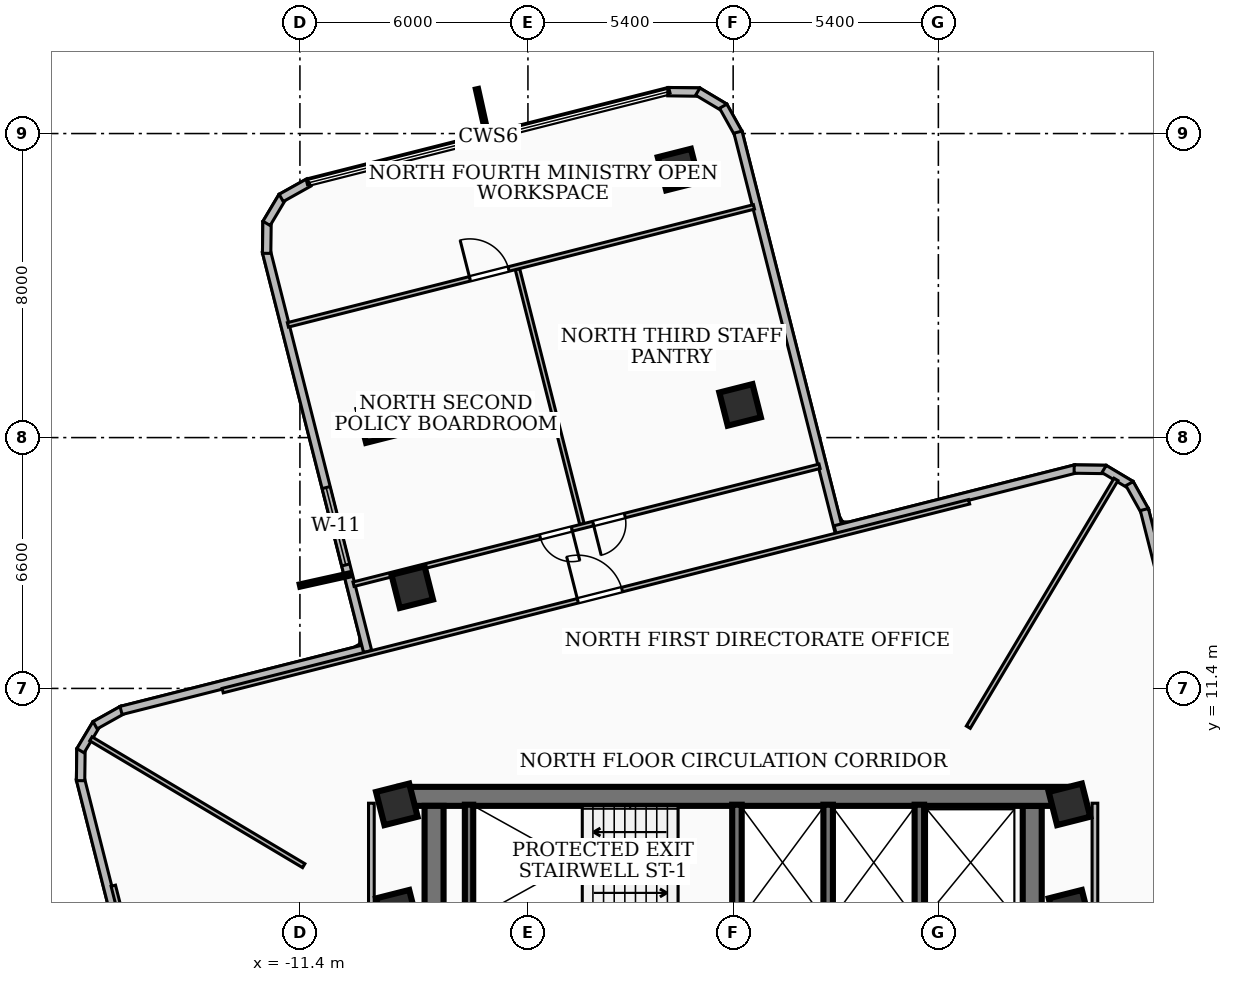
"""IFC4 building model, lengths in metres.
Left out: names, types, materials, properties, quantities, classifications, styles, units other than length and angle.
Written with IfcOpenShell. Run it as: python <this file> out.ifc"""

import sys

from ifc_helpers import new_model, si_unit, direction, frame, frame_2d, origin, origin_2d, place, context, subcontext, project, spatial, rectangle, extrude, element, fill, save


model = new_model("IFC4")
c1 = context("Model", 3, precision=1e-05, world=origin(), true_north=direction((0.0, 1.0)))
c2 = subcontext(c1, "Body", "Model", "MODEL_VIEW")
j1 = project(units=[si_unit("LENGTHUNIT", "METRE"), si_unit("PLANEANGLEUNIT", "RADIAN")], contexts=[c1])
p1 = place(None, origin())
s1 = spatial("IfcSite", under=j1, at=p1, CompositionType="ELEMENT")
p2 = place(p1, origin())
s2 = spatial("IfcBuilding", under=s1, at=p2, CompositionType="ELEMENT")
p3 = place(p2, frame((0.0, 0.0, 127.08)))
s3 = spatial("IfcBuildingStorey", under=s2, at=p3, CompositionType="ELEMENT", Elevation=127.08)
p4 = place(p3, frame((-8.78, 8.56, 0.0), z_axis=(0.0, 0.0, 1.0), x_axis=(1.0, 0.0, 0.0)))
e1 = element("IfcWall", 1, at=p4, inside=s3, PredefinedType="SHEAR", context=c2, shape_type="SweptSolid", body=[
    extrude(rectangle(XDim=17.56, YDim=0.5, at=frame_2d((8.78, 0.0))), origin(), (0.0, 0.0, 1.0), 3.34),
])
for number, where, z_axis, x_axis in (
    (2, (-7.87, 2.0, 0.0), (0.0, 0.0, 1.0), (0.0, 1.0, 0.0)),
    (3, (7.87, 8.31, 0.0), (0.0, 0.0, 1.0), (0.0, -1.0, 0.0)),
):
    element("IfcWall", number, at=place(p3, frame(where, z_axis=z_axis, x_axis=x_axis)), inside=s3, PredefinedType="SHEAR", context=c2, shape_type="SweptSolid", body=[
        extrude(rectangle(XDim=6.31, YDim=0.5, at=frame_2d((3.155, 0.0))), origin(), (0.0, 0.0, 1.0), 3.34),
    ])
p5 = place(p3, frame((-6.95, 5.28, 0.0), z_axis=(0.0, 0.0, 1.0), x_axis=(0.0, 1.0, 0.0)))
e4 = element("IfcWall", 4, at=p5, inside=s3, PredefinedType="SOLIDWALL", context=c2, shape_type="SweptSolid", body=[
    extrude(rectangle(XDim=3.06, YDim=0.22, at=frame_2d((1.53, 0.0))), origin(), (0.0, 0.0, 1.0), 3.34),
])
for number, where, z_axis, x_axis in (
    (5, (0.1, 5.3, 0.0), (0.0, 0.0, 1.0), (0.0, 1.0, 0.0)),
    (6, (2.5, 5.3, 0.0), (0.0, 0.0, 1.0), (0.0, 1.0, 0.0)),
    (7, (4.9, 5.3, 0.0), (0.0, 0.0, 1.0), (0.0, 1.0, 0.0)),
):
    element("IfcWall", number, at=place(p3, frame(where, z_axis=z_axis, x_axis=x_axis)), inside=s3, PredefinedType="SOLIDWALL", context=c2, shape_type="SweptSolid", body=[
        extrude(rectangle(XDim=3.04, YDim=0.25, at=frame_2d((1.52, 0.0))), origin(), (0.0, 0.0, 1.0), 3.34),
    ])
for number, where, z_axis, x_axis in (
    (8, (-8.85, 5.55, 0.0), (0.0, 0.0, 1.0), (0.969, 0.245, 0.0)),
    (9, (8.85, 5.55, 0.0), (0.0, 0.0, 1.0), (0.969, 0.245, 0.0)),
    (10, (-8.85, 8.35, 0.0), (0.0, 0.0, 1.0), (0.969, 0.245, 0.0)),
    (11, (8.85, 8.35, 0.0), (0.0, 0.0, 1.0), (0.969, 0.245, 0.0)),
    (12, (0.183, 18.86, 0.0), (0.0, 0.0, 1.0), (0.969, 0.245, 0.0)),
    (13, (-8.445, 14.064, 0.0), (0.0, 0.0, 1.0), (0.969, 0.245, 0.0)),
    (14, (-1.437, 25.052, 0.0), (0.0, 0.0, 1.0), (0.969, 0.245, 0.0)),
    (15, (-9.333, 18.409, 0.0), (0.0, 0.0, 1.0), (0.969, 0.245, 0.0)),
):
    element("IfcColumn", number, at=place(p3, frame(where, z_axis=z_axis, x_axis=x_axis)), inside=s3, PredefinedType="COLUMN", context=c2, shape_type="SweptSolid", body=[
        extrude(rectangle(XDim=0.9, YDim=0.9, at=origin_2d()), origin(), (0.0, 0.0, 1.0), 3.6),
    ])
p6 = place(p3, frame((-15.574, 2.684, 0.0), z_axis=(0.0, 0.0, 1.0), x_axis=(-0.245346347134, 0.969435490349, 0.0)))
e16 = element("IfcWall", 16, at=p6, inside=s3, PredefinedType="SOLIDWALL", context=c2, shape_type="SweptSolid", body=[
    extrude(rectangle(XDim=6.538, YDim=0.22, at=frame_2d((3.269, 0.0))), origin(), (0.0, 0.0, 1.0), 3.34),
])
p7 = place(p3, frame((-17.172, 8.973, 0.0), z_axis=(0.0, 0.0, 1.0), x_axis=(0.013464821393, 0.999909345183, 0.0)))
e17 = element("IfcWall", 17, at=p7, inside=s3, PredefinedType="SOLIDWALL", context=c2, shape_type="SweptSolid", body=[
    extrude(rectangle(XDim=0.834, YDim=0.22, at=frame_2d((0.417, 0.0))), origin(), (0.0, 0.0, 1.0), 3.34),
])
p8 = place(p3, frame((-17.174, 9.761, 0.0), z_axis=(0.0, 0.0, 1.0), x_axis=(0.512960801038, 0.858412031951, 0.0)))
e18 = element("IfcWall", 18, at=p8, inside=s3, PredefinedType="SOLIDWALL", context=c2, shape_type="SweptSolid", body=[
    extrude(rectangle(XDim=0.819, YDim=0.22, at=frame_2d((0.41, 0.0))), origin(), (0.0, 0.0, 1.0), 3.34),
])
p9 = place(p3, frame((-16.789, 10.431, 0.0), z_axis=(0.0, 0.0, 1.0), x_axis=(0.872870149311, 0.487952561671, 0.0)))
e19 = element("IfcWall", 19, at=p9, inside=s3, PredefinedType="SOLIDWALL", context=c2, shape_type="SweptSolid", body=[
    extrude(rectangle(XDim=0.834, YDim=0.22, at=frame_2d((0.417, 0.0))), origin(), (0.0, 0.0, 1.0), 3.34),
])
p10 = place(p3, frame((-16.107, 10.82, 0.0), z_axis=(0.0, 0.0, 1.0), x_axis=(0.969443674581, 0.245314006561, 0.0)))
e20 = element("IfcWall", 20, at=p10, inside=s3, PredefinedType="SOLIDWALL", context=c2, shape_type="SweptSolid", body=[
    extrude(rectangle(XDim=6.759, YDim=0.22, at=frame_2d((3.379, 0.0))), origin(), (0.0, 0.0, 1.0), 3.34),
])
p11 = place(p3, frame((-9.618, 12.371, 0.0), z_axis=(0.0, 0.0, 1.0), x_axis=(-0.245359810912, 0.969432082814, 0.0)))
e21 = element("IfcWall", 21, at=p11, inside=s3, PredefinedType="SOLIDWALL", context=c2, shape_type="SweptSolid", body=[
    extrude(rectangle(XDim=10.858, YDim=0.22, at=frame_2d((5.429, 0.0))), origin(), (0.0, 0.0, 1.0), 3.34),
])
p12 = place(p11, frame((2.35, 0.0, 0.85)))
e22 = element("IfcOpeningElement", 22, at=p12, cuts=e21, PredefinedType="OPENING", context=c2, shape_type="SweptSolid", body=[
    extrude(rectangle(XDim=2.1, YDim=1.6, at=frame_2d((1.05, 0.8))), frame((0.0, 0.12, 0.0), z_axis=(0.0, -1.0, 0.0), x_axis=(1.0, 0.0, 0.0)), (0.0, 0.0, 1.0), 0.24),
])
p13 = place(p3, frame((-12.276, 22.848, 0.0), z_axis=(0.0, 0.0, 1.0), x_axis=(0.013172159236, 0.999913243347, 0.0)))
e23 = element("IfcWall", 23, at=p13, inside=s3, PredefinedType="SOLIDWALL", context=c2, shape_type="SweptSolid", body=[
    extrude(rectangle(XDim=0.834, YDim=0.22, at=frame_2d((0.417, 0.0))), origin(), (0.0, 0.0, 1.0), 3.34),
])
p14 = place(p3, frame((-12.278, 23.636, 0.0), z_axis=(0.0, 0.0, 1.0), x_axis=(0.512960801038, 0.858412031951, 0.0)))
e24 = element("IfcWall", 24, at=p14, inside=s3, PredefinedType="SOLIDWALL", context=c2, shape_type="SweptSolid", body=[
    extrude(rectangle(XDim=0.819, YDim=0.22, at=frame_2d((0.41, 0.0))), origin(), (0.0, 0.0, 1.0), 3.34),
])
p15 = place(p3, frame((-11.893, 24.306, 0.0), z_axis=(0.0, 0.0, 1.0), x_axis=(0.872870149311, 0.487952561671, 0.0)))
e25 = element("IfcWall", 25, at=p15, inside=s3, PredefinedType="SOLIDWALL", context=c2, shape_type="SweptSolid", body=[
    extrude(rectangle(XDim=0.834, YDim=0.22, at=frame_2d((0.417, 0.0))), origin(), (0.0, 0.0, 1.0), 3.34),
])
p16 = place(p3, frame((-1.72, 27.102, 0.0), z_axis=(0.0, 0.0, 1.0), x_axis=(0.999913446142, -0.01315675587, 0.0)))
e26 = element("IfcWall", 26, at=p16, inside=s3, PredefinedType="SOLIDWALL", context=c2, shape_type="SweptSolid", body=[
    extrude(rectangle(XDim=0.835, YDim=0.22, at=frame_2d((0.417, 0.0))), origin(), (0.0, 0.0, 1.0), 3.34),
])
p17 = place(p3, frame((-0.931, 27.104, 0.0), z_axis=(0.0, 0.0, 1.0), x_axis=(0.858676543827, -0.512517895376, 0.0)))
e27 = element("IfcWall", 27, at=p17, inside=s3, PredefinedType="SOLIDWALL", context=c2, shape_type="SweptSolid", body=[
    extrude(rectangle(XDim=0.817, YDim=0.22, at=frame_2d((0.409, 0.0))), origin(), (0.0, 0.0, 1.0), 3.34),
])
p18 = place(p3, frame((-0.262, 26.72, 0.0), z_axis=(0.0, 0.0, 1.0), x_axis=(0.487454303052, -0.873148499647, 0.0)))
e28 = element("IfcWall", 28, at=p18, inside=s3, PredefinedType="SOLIDWALL", context=c2, shape_type="SweptSolid", body=[
    extrude(rectangle(XDim=0.835, YDim=0.22, at=frame_2d((0.417, 0.0))), origin(), (0.0, 0.0, 1.0), 3.34),
])
p19 = place(p3, frame((0.127, 26.037, 0.0), z_axis=(0.0, 0.0, 1.0), x_axis=(0.245354462674, -0.969433436418, 0.0)))
e29 = element("IfcWall", 29, at=p19, inside=s3, PredefinedType="SOLIDWALL", context=c2, shape_type="SweptSolid", body=[
    extrude(rectangle(XDim=10.858, YDim=0.22, at=frame_2d((5.429, 0.0))), origin(), (0.0, 0.0, 1.0), 2.57),
])
p20 = place(p3, frame((2.684, 15.574, 0.0), z_axis=(0.0, 0.0, 1.0), x_axis=(0.969435490349, 0.245346347134, 0.0)))
e30 = element("IfcWall", 30, at=p20, inside=s3, PredefinedType="SOLIDWALL", context=c2, shape_type="SweptSolid", body=[
    extrude(rectangle(XDim=6.538, YDim=0.22, at=frame_2d((3.269, 0.0))), origin(), (0.0, 0.0, 1.0), 2.57),
])
p21 = place(p3, frame((8.973, 17.172, 0.0), z_axis=(0.0, 0.0, 1.0), x_axis=(0.999909345183, -0.013464821393, 0.0)))
e31 = element("IfcWall", 31, at=p21, inside=s3, PredefinedType="SOLIDWALL", context=c2, shape_type="SweptSolid", body=[
    extrude(rectangle(XDim=0.834, YDim=0.22, at=frame_2d((0.417, 0.0))), origin(), (0.0, 0.0, 1.0), 3.34),
])
p22 = place(p3, frame((9.761, 17.174, 0.0), z_axis=(0.0, 0.0, 1.0), x_axis=(0.858412031951, -0.512960801038, 0.0)))
e32 = element("IfcWall", 32, at=p22, inside=s3, PredefinedType="SOLIDWALL", context=c2, shape_type="SweptSolid", body=[
    extrude(rectangle(XDim=0.819, YDim=0.22, at=frame_2d((0.41, 0.0))), origin(), (0.0, 0.0, 1.0), 3.34),
])
p23 = place(p3, frame((10.431, 16.789, 0.0), z_axis=(0.0, 0.0, 1.0), x_axis=(0.487952561671, -0.872870149311, 0.0)))
e33 = element("IfcWall", 33, at=p23, inside=s3, PredefinedType="SOLIDWALL", context=c2, shape_type="SweptSolid", body=[
    extrude(rectangle(XDim=0.834, YDim=0.22, at=frame_2d((0.417, 0.0))), origin(), (0.0, 0.0, 1.0), 3.34),
])
p24 = place(p3, frame((10.82, 16.107, 0.0), z_axis=(0.0, 0.0, 1.0), x_axis=(0.245314006561, -0.969443674581, 0.0)))
e34 = element("IfcWall", 34, at=p24, inside=s3, PredefinedType="SOLIDWALL", context=c2, shape_type="SweptSolid", body=[
    extrude(rectangle(XDim=6.759, YDim=0.22, at=frame_2d((3.379, 0.0))), origin(), (0.0, 0.0, 1.0), 2.644),
])
for number, where, z_axis, x_axis in (
    (35, (-9.52, 1.75, 0.0), (0.0, 0.0, 1.0), (0.0, 1.0, 0.0)),
    (36, (9.52, 1.75, 0.0), (0.0, 0.0, 1.0), (0.0, 1.0, 0.0)),
):
    element("IfcWall", number, at=place(p3, frame(where, z_axis=z_axis, x_axis=x_axis)), inside=s3, PredefinedType="PARTITIONING", context=c2, shape_type="SweptSolid", body=[
        extrude(rectangle(XDim=6.63, YDim=0.15, at=frame_2d((3.315, 0.0))), origin(), (0.0, 0.0, 1.0), 2.57),
    ])
p25 = place(p3, frame((6.188, 10.38, 0.0), z_axis=(0.0, 0.0, 1.0), x_axis=(0.511972353143, 0.859001926434, 0.0)))
e37 = element("IfcWall", 37, at=p25, inside=s3, PredefinedType="PARTITIONING", context=c2, shape_type="SweptSolid", body=[
    extrude(rectangle(XDim=7.59, YDim=0.12, at=frame_2d((3.795, 0.0))), origin(), (0.0, 0.0, 1.0), 2.57),
])
p26 = place(p3, frame((-11.3, 6.736, 0.0), z_axis=(0.0, 0.0, 1.0), x_axis=(-0.858979599017, 0.512009812868, 0.0)))
e38 = element("IfcWall", 38, at=p26, inside=s3, PredefinedType="PARTITIONING", context=c2, shape_type="SweptSolid", body=[
    extrude(rectangle(XDim=6.519, YDim=0.12, at=frame_2d((3.26, 0.0))), origin(), (0.0, 0.0, 1.0), 3.34),
])
p27 = place(p3, frame((-13.433, 11.342, 0.0), z_axis=(0.0, 0.0, 1.0), x_axis=(0.969459652587, 0.24525085526, 0.0)))
e39 = element("IfcWall", 39, at=p27, inside=s3, PredefinedType="PARTITIONING", context=c2, shape_type="SweptSolid", body=[
    extrude(rectangle(XDim=20.261, YDim=0.12, at=frame_2d((10.13, 0.0))), origin(), (0.0, 0.0, 1.0), 2.57),
])
p28 = place(p27, frame((9.64, 0.0, 0.0)))
e40 = element("IfcOpeningElement", 40, at=p28, cuts=e39, PredefinedType="OPENING", context=c2, shape_type="SweptSolid", body=[
    extrude(rectangle(XDim=1.2, YDim=2.1, at=frame_2d((0.6, 1.05))), frame((0.0, 0.07, 0.0), z_axis=(0.0, -1.0, 0.0), x_axis=(1.0, 0.0, 0.0)), (0.0, 0.0, 1.0), 0.14),
])
p29 = place(p3, frame((-3.979, 15.724, 0.0), z_axis=(0.0, 0.0, 1.0), x_axis=(-0.245224196517, 0.969466396242, 0.0)))
e41 = element("IfcWall", 41, at=p29, inside=s3, PredefinedType="PARTITIONING", context=c2, shape_type="SweptSolid", body=[
    extrude(rectangle(XDim=6.92, YDim=0.12, at=frame_2d((3.46, 0.0))), origin(), (0.0, 0.0, 1.0), 2.72),
])
p30 = place(p3, frame((2.274, 17.245, 0.0), z_axis=(0.0, 0.0, 1.0), x_axis=(-0.969444849394, -0.24530936383, 0.0)))
e42 = element("IfcWall", 42, at=p30, inside=s3, PredefinedType="PARTITIONING", context=c2, shape_type="SweptSolid", body=[
    extrude(rectangle(XDim=12.649, YDim=0.12, at=frame_2d((6.325, 0.0))), origin(), (0.0, 0.0, 1.0), 2.57),
])
p31 = place(p30, frame((5.285, 0.0, 0.0)))
e43 = element("IfcOpeningElement", 43, at=p31, cuts=e42, PredefinedType="OPENING", context=c2, shape_type="SweptSolid", body=[
    extrude(rectangle(XDim=0.86, YDim=2.04, at=frame_2d((0.43, 1.02))), frame((0.0, 0.07, 0.0), z_axis=(0.0, -1.0, 0.0), x_axis=(1.0, 0.0, 0.0)), (0.0, 0.0, 1.0), 0.14),
])
p32 = place(p30, frame((6.725, 0.0, 0.0)))
e44 = element("IfcOpeningElement", 44, at=p32, cuts=e42, PredefinedType="OPENING", context=c2, shape_type="SweptSolid", body=[
    extrude(rectangle(XDim=0.86, YDim=2.04, at=frame_2d((0.43, 1.02))), frame((0.0, 0.07, 0.0), z_axis=(0.0, -1.0, 0.0), x_axis=(1.0, 0.0, 0.0)), (0.0, 0.0, 1.0), 0.14),
])
p33 = place(p3, frame((-11.716, 20.966, 0.0), z_axis=(0.0, 0.0, 1.0), x_axis=(0.96942764939, 0.245377326983, 0.0)))
e45 = element("IfcWall", 45, at=p33, inside=s3, PredefinedType="PARTITIONING", context=c2, shape_type="SweptSolid", body=[
    extrude(rectangle(XDim=12.65, YDim=0.12, at=frame_2d((6.325, 0.0))), origin(), (0.0, 0.0, 1.0), 2.57),
])
p34 = place(p33, frame((4.94, 0.0, 0.0)))
e46 = element("IfcOpeningElement", 46, at=p34, cuts=e45, PredefinedType="OPENING", context=c2, shape_type="SweptSolid", body=[
    extrude(rectangle(XDim=1.05, YDim=2.08, at=frame_2d((0.525, 1.04))), frame((0.0, 0.07, 0.0), z_axis=(0.0, -1.0, 0.0), x_axis=(1.0, 0.0, 0.0)), (0.0, 0.0, 1.0), 0.14),
])
p35 = place(p3, frame((-11.342, -13.433, 0.0), z_axis=(0.0, 0.0, 1.0), x_axis=(-0.24525085526, 0.969459652587, 0.0)))
e47 = element("IfcWall", 47, at=p35, inside=s3, PredefinedType="PARTITIONING", context=c2, shape_type="SweptSolid", body=[
    extrude(rectangle(XDim=20.261, YDim=0.12, at=frame_2d((10.13, 0.0))), origin(), (0.0, 0.0, 1.0), 2.57),
])
p36 = place(p35, frame((9.64, 0.0, 0.0)))
e48 = element("IfcOpeningElement", 48, at=p36, cuts=e47, PredefinedType="OPENING", context=c2, shape_type="SweptSolid", body=[
    extrude(rectangle(XDim=1.2, YDim=2.1, at=frame_2d((0.6, 1.05))), frame((0.0, 0.07, 0.0), z_axis=(0.0, -1.0, 0.0), x_axis=(1.0, 0.0, 0.0)), (0.0, 0.0, 1.0), 0.14),
])
p37 = place(p12, origin())
e49 = element("IfcWindow", 49, at=p37, inside=s3, PartitioningType="SINGLE_PANEL", PredefinedType="WINDOW", context=c2, shape_type="SweptSolid", body=[
    extrude(rectangle(XDim=2.1, YDim=1.6, at=frame_2d((1.05, 0.8))), frame((0.0, 0.03, 0.0), z_axis=(0.0, -1.0, 0.0), x_axis=(1.0, 0.0, 0.0)), (0.0, 0.0, 1.0), 0.06),
])
fill(e22, e49)
p38 = place(p28, origin())
e50 = element("IfcDoor", 50, at=p38, inside=s3, OperationType="SINGLE_SWING_LEFT", PredefinedType="DOOR", context=c2, shape_type="SweptSolid", body=[
    extrude(rectangle(XDim=1.2, YDim=2.1, at=frame_2d((0.6, 1.05))), frame((0.0, 0.025, 0.0), z_axis=(0.0, -1.0, 0.0), x_axis=(1.0, 0.0, 0.0)), (0.0, 0.0, 1.0), 0.05),
])
fill(e40, e50)
p39 = place(p31, origin())
e51 = element("IfcDoor", 51, at=p39, inside=s3, OperationType="SINGLE_SWING_RIGHT", PredefinedType="DOOR", context=c2, shape_type="SweptSolid", body=[
    extrude(rectangle(XDim=0.86, YDim=2.04, at=frame_2d((0.43, 1.02))), frame((0.0, 0.025, 0.0), z_axis=(0.0, -1.0, 0.0), x_axis=(1.0, 0.0, 0.0)), (0.0, 0.0, 1.0), 0.05),
])
fill(e43, e51)
p40 = place(p32, origin())
e52 = element("IfcDoor", 52, at=p40, inside=s3, OperationType="SINGLE_SWING_LEFT", PredefinedType="DOOR", context=c2, shape_type="SweptSolid", body=[
    extrude(rectangle(XDim=0.86, YDim=2.04, at=frame_2d((0.43, 1.02))), frame((0.0, 0.025, 0.0), z_axis=(0.0, -1.0, 0.0), x_axis=(1.0, 0.0, 0.0)), (0.0, 0.0, 1.0), 0.05),
])
fill(e44, e52)
p41 = place(p34, origin())
e53 = element("IfcDoor", 53, at=p41, inside=s3, OperationType="SINGLE_SWING_LEFT", PredefinedType="DOOR", context=c2, shape_type="SweptSolid", body=[
    extrude(rectangle(XDim=1.05, YDim=2.08, at=frame_2d((0.525, 1.04))), frame((0.0, 0.025, 0.0), z_axis=(0.0, -1.0, 0.0), x_axis=(1.0, 0.0, 0.0)), (0.0, 0.0, 1.0), 0.05),
])
fill(e46, e53)
save(model, sys.argv[1])
